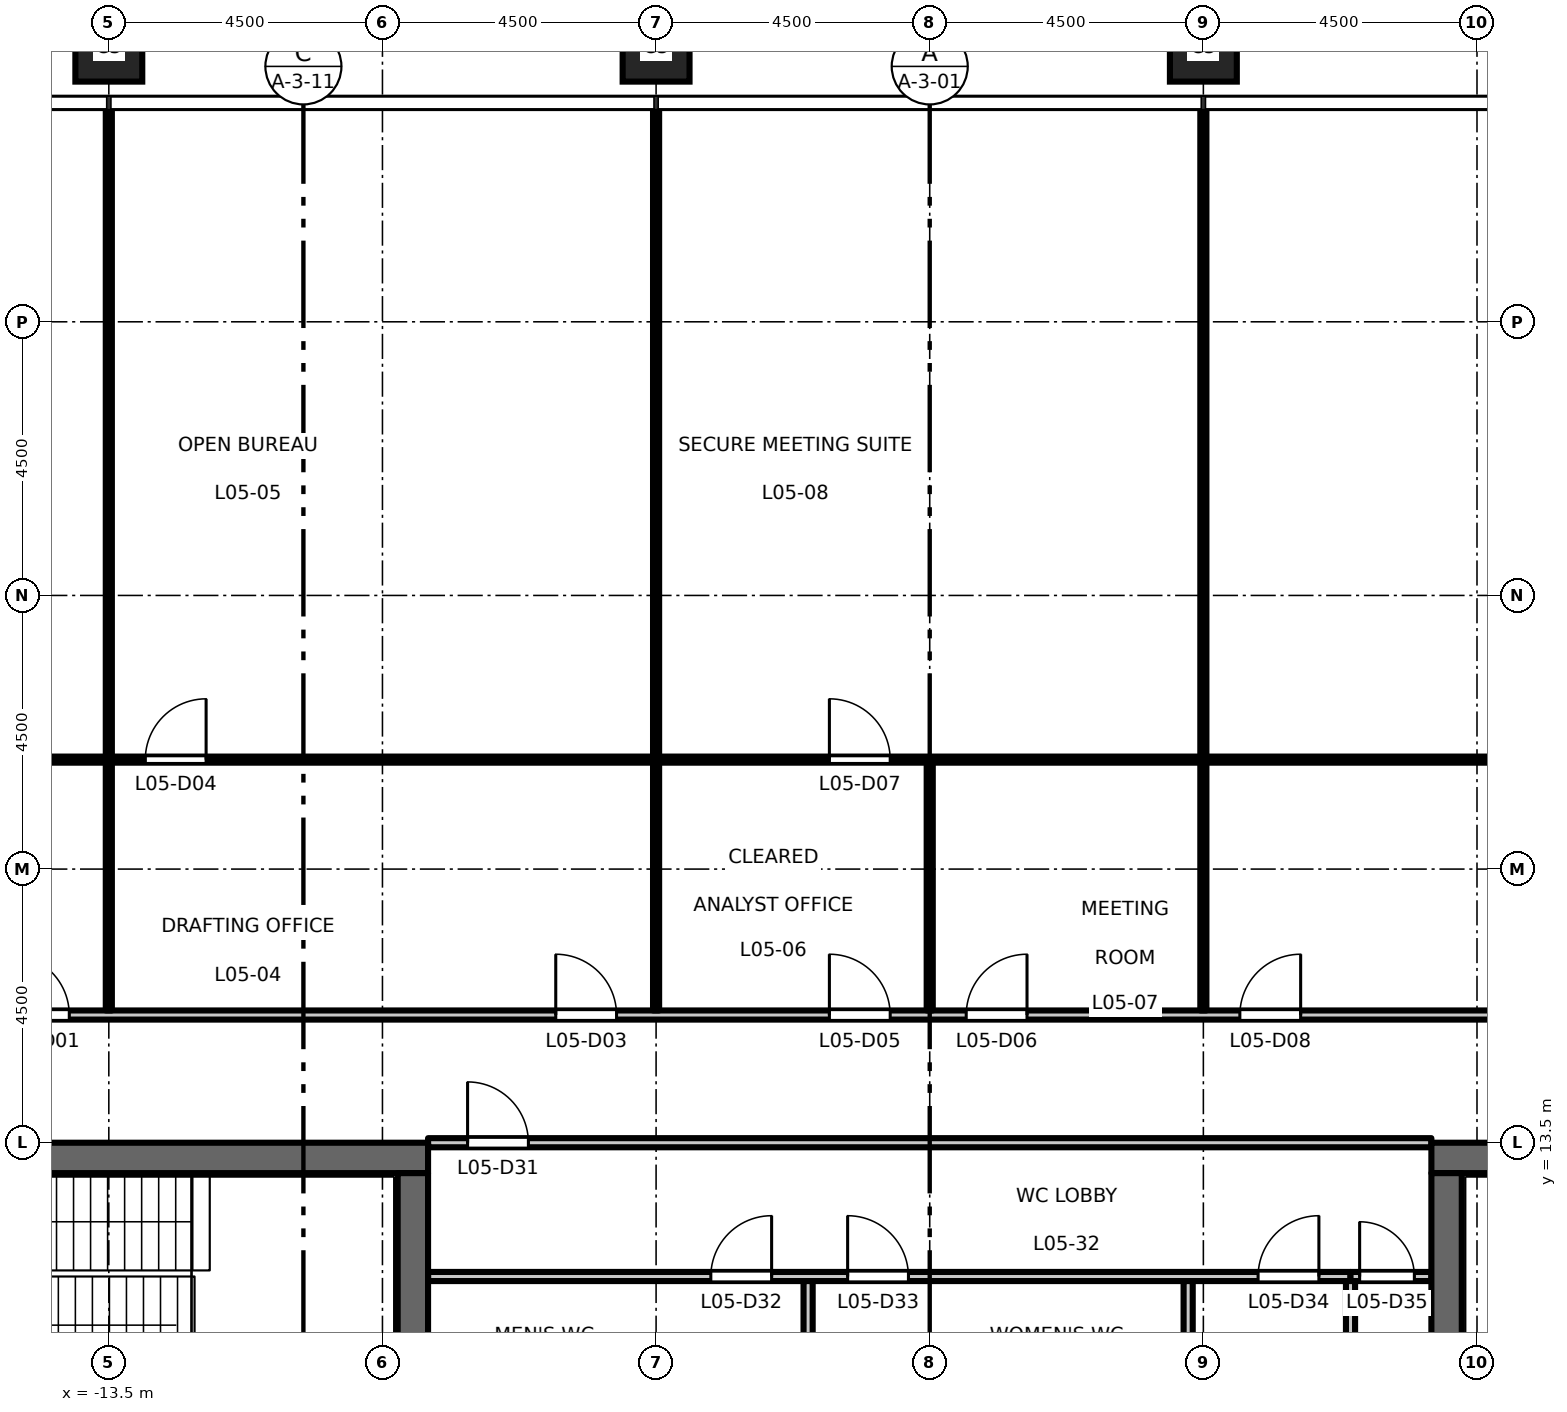
"""IFC4 building model, lengths in metres.
Left out: names, types, materials, properties, quantities, classifications, styles, units other than length and angle.
Written with IfcOpenShell. Run it as: python <this file> out.ifc"""

import sys

from ifc_helpers import new_model, si_unit, direction, frame, frame_2d, origin, origin_2d, place, context, subcontext, project, spatial, rectangle, hollow_rectangle, extrude, element, fill, save


model = new_model("IFC4")
c1 = context("Model", 3, precision=1e-05, world=origin(), true_north=direction((0.0, 1.0)))
c2 = subcontext(c1, "Body", "Model", "MODEL_VIEW")
j1 = project(units=[si_unit("LENGTHUNIT", "METRE"), si_unit("PLANEANGLEUNIT", "RADIAN")], contexts=[c1])
p1 = place(None, origin())
s1 = spatial("IfcSite", under=j1, at=p1, CompositionType="ELEMENT")
p2 = place(p1, origin())
s2 = spatial("IfcBuilding", under=s1, at=p2, CompositionType="ELEMENT")
p3 = place(p2, frame((0.0, 0.0, 26.7)))
s3 = spatial("IfcBuildingStorey", under=s2, at=p3, CompositionType="ELEMENT", Elevation=26.7)
for number, where, z_axis, x_axis in (
    (1, (4.5, 31.5, 0.0), (0.0, 0.0, 1.0), (1.0, 0.0, 0.0)),
    (2, (-4.5, 31.5, 0.0), (0.0, 0.0, 1.0), (1.0, 0.0, 0.0)),
    (3, (-13.5, 31.5, 0.0), (0.0, 0.0, 1.0), (1.0, 0.0, 0.0)),
):
    element("IfcColumn", number, at=place(p3, frame(where, z_axis=z_axis, x_axis=x_axis)), inside=s3, PredefinedType="COLUMN", context=c2, shape_type="SweptSolid", body=[
        extrude(hollow_rectangle(XDim=1.1, YDim=1.1, WallThickness=0.07, at=origin_2d()), origin(), (0.0, 0.0, 1.0), 4.5),
    ])
p4 = place(p3, frame((-8.25, 13.25, 0.0), z_axis=(0.0, 0.0, 1.0), x_axis=(-1.0, 0.0, 0.0)))
e4 = element("IfcWall", 4, at=p4, inside=s3, PredefinedType="SHEAR", context=c2, shape_type="SweptSolid", body=[
    extrude(rectangle(XDim=13.5, YDim=0.5, at=frame_2d((6.75, 0.0))), origin(), (0.0, 0.0, 1.0), 4.35),
])
p5 = place(p3, frame((-8.5, -13.0, 0.0), z_axis=(0.0, 0.0, 1.0), x_axis=(0.0, 1.0, 0.0)))
e5 = element("IfcWall", 5, at=p5, inside=s3, PredefinedType="SHEAR", context=c2, shape_type="SweptSolid", body=[
    extrude(rectangle(XDim=26.0, YDim=0.5, at=frame_2d((13.0, 0.0))), origin(), (0.0, 0.0, 1.0), 4.35),
])
p6 = place(p3, frame((8.25, 13.25, 0.0), z_axis=(0.0, 0.0, 1.0), x_axis=(1.0, 0.0, 0.0)))
e6 = element("IfcWall", 6, at=p6, inside=s3, PredefinedType="SHEAR", context=c2, shape_type="SweptSolid", body=[
    extrude(rectangle(XDim=13.5, YDim=0.5, at=frame_2d((6.75, 0.0))), origin(), (0.0, 0.0, 1.0), 4.35),
])
p7 = place(p3, frame((8.5, -13.0, 0.0), z_axis=(0.0, 0.0, 1.0), x_axis=(0.0, 1.0, 0.0)))
e7 = element("IfcWall", 7, at=p7, inside=s3, PredefinedType="SHEAR", context=c2, shape_type="SweptSolid", body=[
    extrude(rectangle(XDim=26.0, YDim=0.5, at=frame_2d((13.0, 0.0))), origin(), (0.0, 0.0, 1.0), 4.35),
])
p8 = place(p3, frame((-8.25, 11.3, 0.0), z_axis=(0.0, 0.0, 1.0), x_axis=(1.0, 0.0, 0.0)))
e8 = element("IfcWall", 8, at=p8, inside=s3, PredefinedType="PARTITIONING", context=c2, shape_type="SweptSolid", body=[
    extrude(rectangle(XDim=15.17, YDim=0.15, at=frame_2d((7.585, 0.0))), origin(), (0.0, 0.0, 1.0), 4.35),
])
p9 = place(p8, frame((4.65, 0.0, 0.0)))
e9 = element("IfcOpeningElement", 9, at=p9, cuts=e8, PredefinedType="OPENING", context=c2, shape_type="SweptSolid", body=[
    extrude(rectangle(XDim=1.0, YDim=2.1, at=frame_2d((0.5, 1.05))), frame((0.0, 0.085, 0.0), z_axis=(0.0, -1.0, 0.0), x_axis=(1.0, 0.0, 0.0)), (0.0, 0.0, 1.0), 0.17),
])
p10 = place(p8, frame((6.9, 0.0, 0.0)))
e10 = element("IfcOpeningElement", 10, at=p10, cuts=e8, PredefinedType="OPENING", context=c2, shape_type="SweptSolid", body=[
    extrude(rectangle(XDim=1.0, YDim=2.1, at=frame_2d((0.5, 1.05))), frame((0.0, 0.085, 0.0), z_axis=(0.0, -1.0, 0.0), x_axis=(1.0, 0.0, 0.0)), (0.0, 0.0, 1.0), 0.17),
])
p11 = place(p8, frame((13.65, 0.0, 0.0)))
e11 = element("IfcOpeningElement", 11, at=p11, cuts=e8, PredefinedType="OPENING", context=c2, shape_type="SweptSolid", body=[
    extrude(rectangle(XDim=1.0, YDim=2.1, at=frame_2d((0.5, 1.05))), frame((0.0, 0.085, 0.0), z_axis=(0.0, -1.0, 0.0), x_axis=(1.0, 0.0, 0.0)), (0.0, 0.0, 1.0), 0.17),
])
p12 = place(p3, frame((6.92, 11.3, 0.0), z_axis=(0.0, 0.0, 1.0), x_axis=(1.0, 0.0, 0.0)))
e12 = element("IfcWall", 12, at=p12, inside=s3, PredefinedType="PARTITIONING", context=c2, shape_type="SweptSolid", body=[
    extrude(rectangle(XDim=1.33, YDim=0.15, at=frame_2d((0.665, 0.0))), origin(), (0.0, 0.0, 1.0), 4.35),
])
p13 = place(p12, frame((0.15, 0.0, 0.0)))
e13 = element("IfcOpeningElement", 13, at=p13, cuts=e12, PredefinedType="OPENING", context=c2, shape_type="SweptSolid", body=[
    extrude(rectangle(XDim=0.9, YDim=2.1, at=frame_2d((0.45, 1.05))), frame((0.0, 0.085, 0.0), z_axis=(0.0, -1.0, 0.0), x_axis=(1.0, 0.0, 0.0)), (0.0, 0.0, 1.0), 0.17),
])
p14 = place(p3, frame((-8.25, 13.5, 0.0), z_axis=(0.0, 0.0, 1.0), x_axis=(1.0, 0.0, 0.0)))
e14 = element("IfcWall", 14, at=p14, inside=s3, PredefinedType="PARTITIONING", context=c2, shape_type="SweptSolid", body=[
    extrude(rectangle(XDim=16.5, YDim=0.15, at=frame_2d((8.25, 0.0))), origin(), (0.0, 0.0, 1.0), 3.85),
])
p15 = place(p14, frame((0.65, 0.0, 0.0)))
e15 = element("IfcOpeningElement", 15, at=p15, cuts=e14, PredefinedType="OPENING", context=c2, shape_type="SweptSolid", body=[
    extrude(rectangle(XDim=1.0, YDim=2.1, at=frame_2d((0.5, 1.05))), frame((0.0, 0.085, 0.0), z_axis=(0.0, -1.0, 0.0), x_axis=(1.0, 0.0, 0.0)), (0.0, 0.0, 1.0), 0.17),
])
p16 = place(p3, frame((-30.51, 15.6, 0.0), z_axis=(0.0, 0.0, 1.0), x_axis=(1.0, 0.0, 0.0)))
e16 = element("IfcWall", 16, at=p16, inside=s3, PredefinedType="PARTITIONING", context=c2, shape_type="SweptSolid", body=[
    extrude(rectangle(XDim=61.02, YDim=0.15, at=frame_2d((30.51, 0.0))), origin(), (0.0, 0.0, 1.0), 4.35),
])
p17 = place(p16, frame((15.36, 0.0, 0.0)))
e17 = element("IfcOpeningElement", 17, at=p17, cuts=e16, PredefinedType="OPENING", context=c2, shape_type="SweptSolid", body=[
    extrude(rectangle(XDim=1.0, YDim=2.1, at=frame_2d((0.5, 1.05))), frame((0.0, 0.085, 0.0), z_axis=(0.0, -1.0, 0.0), x_axis=(1.0, 0.0, 0.0)), (0.0, 0.0, 1.0), 0.17),
])
p18 = place(p16, frame((24.36, 0.0, 0.0)))
e18 = element("IfcOpeningElement", 18, at=p18, cuts=e16, PredefinedType="OPENING", context=c2, shape_type="SweptSolid", body=[
    extrude(rectangle(XDim=1.0, YDim=2.1, at=frame_2d((0.5, 1.05))), frame((0.0, 0.085, 0.0), z_axis=(0.0, -1.0, 0.0), x_axis=(1.0, 0.0, 0.0)), (0.0, 0.0, 1.0), 0.17),
])
p19 = place(p16, frame((28.86, 0.0, 0.0)))
e19 = element("IfcOpeningElement", 19, at=p19, cuts=e16, PredefinedType="OPENING", context=c2, shape_type="SweptSolid", body=[
    extrude(rectangle(XDim=1.0, YDim=2.1, at=frame_2d((0.5, 1.05))), frame((0.0, 0.085, 0.0), z_axis=(0.0, -1.0, 0.0), x_axis=(1.0, 0.0, 0.0)), (0.0, 0.0, 1.0), 0.17),
])
p20 = place(p16, frame((31.11, 0.0, 0.0)))
e20 = element("IfcOpeningElement", 20, at=p20, cuts=e16, PredefinedType="OPENING", context=c2, shape_type="SweptSolid", body=[
    extrude(rectangle(XDim=1.0, YDim=2.1, at=frame_2d((0.5, 1.05))), frame((0.0, 0.085, 0.0), z_axis=(0.0, -1.0, 0.0), x_axis=(1.0, 0.0, 0.0)), (0.0, 0.0, 1.0), 0.17),
])
p21 = place(p16, frame((35.61, 0.0, 0.0)))
e21 = element("IfcOpeningElement", 21, at=p21, cuts=e16, PredefinedType="OPENING", context=c2, shape_type="SweptSolid", body=[
    extrude(rectangle(XDim=1.0, YDim=2.1, at=frame_2d((0.5, 1.05))), frame((0.0, 0.085, 0.0), z_axis=(0.0, -1.0, 0.0), x_axis=(1.0, 0.0, 0.0)), (0.0, 0.0, 1.0), 0.17),
])
p22 = place(p16, frame((44.61, 0.0, 0.0)))
e22 = element("IfcOpeningElement", 22, at=p22, cuts=e16, PredefinedType="OPENING", context=c2, shape_type="SweptSolid", body=[
    extrude(rectangle(XDim=1.0, YDim=2.1, at=frame_2d((0.5, 1.05))), frame((0.0, 0.085, 0.0), z_axis=(0.0, -1.0, 0.0), x_axis=(1.0, 0.0, 0.0)), (0.0, 0.0, 1.0), 0.17),
])
p23 = place(p16, frame((0.61, 0.0, 0.0)))
e23 = element("IfcOpeningElement", 23, at=p23, cuts=e16, PredefinedType="OPENING", context=c2, shape_type="SweptSolid", body=[
    extrude(rectangle(XDim=1.0, YDim=2.1, at=frame_2d((0.5, 1.05))), frame((0.0, 0.085, 0.0), z_axis=(0.0, -1.0, 0.0), x_axis=(1.0, 0.0, 0.0)), (0.0, 0.0, 1.0), 0.17),
])
p24 = place(p16, frame((53.62, 0.0, 0.0)))
e24 = element("IfcOpeningElement", 24, at=p24, cuts=e16, PredefinedType="OPENING", context=c2, shape_type="SweptSolid", body=[
    extrude(rectangle(XDim=1.0, YDim=2.1, at=frame_2d((0.5, 1.05))), frame((0.0, 0.085, 0.0), z_axis=(0.0, -1.0, 0.0), x_axis=(1.0, 0.0, 0.0)), (0.0, 0.0, 1.0), 0.17),
])
p25 = place(p3, frame((-30.51, 19.8, 0.0), z_axis=(0.0, 0.0, 1.0), x_axis=(1.0, 0.0, 0.0)))
e25 = element("IfcWall", 25, at=p25, inside=s3, PredefinedType="PARTITIONING", context=c2, shape_type="SweptSolid", body=[
    extrude(rectangle(XDim=52.96, YDim=0.1, at=frame_2d((26.48, 0.0))), origin(), (0.0, 0.0, 1.0), 4.35),
])
p26 = place(p25, frame((8.61, 0.0, 0.0)))
e26 = element("IfcOpeningElement", 26, at=p26, cuts=e25, PredefinedType="OPENING", context=c2, shape_type="SweptSolid", body=[
    extrude(rectangle(XDim=1.0, YDim=2.1, at=frame_2d((0.5, 1.05))), frame((0.0, 0.06, 0.0), z_axis=(0.0, -1.0, 0.0), x_axis=(1.0, 0.0, 0.0)), (0.0, 0.0, 1.0), 0.12),
])
p27 = place(p25, frame((17.61, 0.0, 0.0)))
e27 = element("IfcOpeningElement", 27, at=p27, cuts=e25, PredefinedType="OPENING", context=c2, shape_type="SweptSolid", body=[
    extrude(rectangle(XDim=1.0, YDim=2.1, at=frame_2d((0.5, 1.05))), frame((0.0, 0.06, 0.0), z_axis=(0.0, -1.0, 0.0), x_axis=(1.0, 0.0, 0.0)), (0.0, 0.0, 1.0), 0.12),
])
p28 = place(p25, frame((28.86, 0.0, 0.0)))
e28 = element("IfcOpeningElement", 28, at=p28, cuts=e25, PredefinedType="OPENING", context=c2, shape_type="SweptSolid", body=[
    extrude(rectangle(XDim=1.0, YDim=2.1, at=frame_2d((0.5, 1.05))), frame((0.0, 0.06, 0.0), z_axis=(0.0, -1.0, 0.0), x_axis=(1.0, 0.0, 0.0)), (0.0, 0.0, 1.0), 0.12),
])
p29 = place(p25, frame((42.36, 0.0, 0.0)))
e29 = element("IfcOpeningElement", 29, at=p29, cuts=e25, PredefinedType="OPENING", context=c2, shape_type="SweptSolid", body=[
    extrude(rectangle(XDim=1.0, YDim=2.1, at=frame_2d((0.5, 1.05))), frame((0.0, 0.06, 0.0), z_axis=(0.0, -1.0, 0.0), x_axis=(1.0, 0.0, 0.0)), (0.0, 0.0, 1.0), 0.12),
])
p30 = place(p25, frame((51.36, 0.0, 0.0)))
e30 = element("IfcOpeningElement", 30, at=p30, cuts=e25, PredefinedType="OPENING", context=c2, shape_type="SweptSolid", body=[
    extrude(rectangle(XDim=1.0, YDim=2.1, at=frame_2d((0.5, 1.05))), frame((0.0, 0.06, 0.0), z_axis=(0.0, -1.0, 0.0), x_axis=(1.0, 0.0, 0.0)), (0.0, 0.0, 1.0), 0.12),
])
p31 = place(p25, frame((6.36, 0.0, 0.0)))
e31 = element("IfcOpeningElement", 31, at=p31, cuts=e25, PredefinedType="OPENING", context=c2, shape_type="SweptSolid", body=[
    extrude(rectangle(XDim=1.0, YDim=2.1, at=frame_2d((0.5, 1.05))), frame((0.0, 0.06, 0.0), z_axis=(0.0, -1.0, 0.0), x_axis=(1.0, 0.0, 0.0)), (0.0, 0.0, 1.0), 0.12),
])
p32 = place(p3, frame((-13.5, 15.675, 0.0), z_axis=(0.0, 0.0, 1.0), x_axis=(0.0, 1.0, 0.0)))
e32 = element("IfcWall", 32, at=p32, inside=s3, PredefinedType="PARTITIONING", context=c2, shape_type="SweptSolid", body=[
    extrude(rectangle(XDim=4.075, YDim=0.1, at=frame_2d((2.038, 0.0))), origin(), (0.0, 0.0, 1.0), 3.35),
])
p33 = place(p3, frame((-13.5, 19.85, 0.0), z_axis=(0.0, 0.0, 1.0), x_axis=(0.0, 1.0, 0.0)))
e33 = element("IfcWall", 33, at=p33, inside=s3, PredefinedType="PARTITIONING", context=c2, shape_type="SweptSolid", body=[
    extrude(rectangle(XDim=10.66, YDim=0.1, at=frame_2d((5.33, 0.0))), origin(), (0.0, 0.0, 1.0), 3.35),
])
p34 = place(p3, frame((-4.5, 15.675, 0.0), z_axis=(0.0, 0.0, 1.0), x_axis=(0.0, 1.0, 0.0)))
e34 = element("IfcWall", 34, at=p34, inside=s3, PredefinedType="PARTITIONING", context=c2, shape_type="SweptSolid", body=[
    extrude(rectangle(XDim=4.075, YDim=0.1, at=frame_2d((2.038, 0.0))), origin(), (0.0, 0.0, 1.0), 3.35),
])
p35 = place(p3, frame((-4.5, 19.85, 0.0), z_axis=(0.0, 0.0, 1.0), x_axis=(0.0, 1.0, 0.0)))
e35 = element("IfcWall", 35, at=p35, inside=s3, PredefinedType="PARTITIONING", context=c2, shape_type="SweptSolid", body=[
    extrude(rectangle(XDim=10.66, YDim=0.1, at=frame_2d((5.33, 0.0))), origin(), (0.0, 0.0, 1.0), 3.35),
])
p36 = place(p3, frame((-2.0, 8.37, 0.0), z_axis=(0.0, 0.0, 1.0), x_axis=(0.0, 1.0, 0.0)))
e36 = element("IfcWall", 36, at=p36, inside=s3, PredefinedType="PARTITIONING", context=c2, shape_type="SweptSolid", body=[
    extrude(rectangle(XDim=2.855, YDim=0.15, at=frame_2d((1.427, 0.0))), origin(), (0.0, 0.0, 1.0), 4.35),
])
p37 = place(p3, frame((0.0, 15.675, 0.0), z_axis=(0.0, 0.0, 1.0), x_axis=(0.0, 1.0, 0.0)))
e37 = element("IfcWall", 37, at=p37, inside=s3, PredefinedType="PARTITIONING", context=c2, shape_type="SweptSolid", body=[
    extrude(rectangle(XDim=4.075, YDim=0.1, at=frame_2d((2.038, 0.0))), origin(), (0.0, 0.0, 1.0), 4.35),
])
p38 = place(p3, frame((4.25, 8.37, 0.0), z_axis=(0.0, 0.0, 1.0), x_axis=(0.0, 1.0, 0.0)))
e38 = element("IfcWall", 38, at=p38, inside=s3, PredefinedType="PARTITIONING", context=c2, shape_type="SweptSolid", body=[
    extrude(rectangle(XDim=2.855, YDim=0.15, at=frame_2d((1.427, 0.0))), origin(), (0.0, 0.0, 1.0), 4.35),
])
p39 = place(p3, frame((4.5, 15.675, 0.0), z_axis=(0.0, 0.0, 1.0), x_axis=(0.0, 1.0, 0.0)))
e39 = element("IfcWall", 39, at=p39, inside=s3, PredefinedType="PARTITIONING", context=c2, shape_type="SweptSolid", body=[
    extrude(rectangle(XDim=4.075, YDim=0.1, at=frame_2d((2.038, 0.0))), origin(), (0.0, 0.0, 1.0), 3.35),
])
p40 = place(p3, frame((4.5, 19.85, 0.0), z_axis=(0.0, 0.0, 1.0), x_axis=(0.0, 1.0, 0.0)))
e40 = element("IfcWall", 40, at=p40, inside=s3, PredefinedType="PARTITIONING", context=c2, shape_type="SweptSolid", body=[
    extrude(rectangle(XDim=10.66, YDim=0.1, at=frame_2d((5.33, 0.0))), origin(), (0.0, 0.0, 1.0), 3.35),
])
p41 = place(p3, frame((6.92, 8.028, 0.0), z_axis=(0.0, 0.0, 1.0), x_axis=(0.0, 1.0, 0.0)))
e41 = element("IfcWall", 41, at=p41, inside=s3, PredefinedType="PARTITIONING", context=c2, shape_type="SweptSolid", body=[
    extrude(rectangle(XDim=3.197, YDim=0.15, at=frame_2d((1.599, 0.0))), origin(), (0.0, 0.0, 1.0), 4.35),
])
p42 = place(p17, origin())
e42 = element("IfcDoor", 42, at=p42, inside=s3, OperationType="SINGLE_SWING_LEFT", PredefinedType="DOOR", context=c2, shape_type="SweptSolid", body=[
    extrude(rectangle(XDim=1.0, YDim=2.1, at=frame_2d((0.5, 1.05))), frame((0.0, 0.025, 0.0), z_axis=(0.0, -1.0, 0.0), x_axis=(1.0, 0.0, 0.0)), (0.0, 0.0, 1.0), 0.05),
])
fill(e17, e42)
p43 = place(p18, origin())
e43 = element("IfcDoor", 43, at=p43, inside=s3, OperationType="SINGLE_SWING_LEFT", PredefinedType="DOOR", context=c2, shape_type="SweptSolid", body=[
    extrude(rectangle(XDim=1.0, YDim=2.1, at=frame_2d((0.5, 1.05))), frame((0.0, 0.025, 0.0), z_axis=(0.0, -1.0, 0.0), x_axis=(1.0, 0.0, 0.0)), (0.0, 0.0, 1.0), 0.05),
])
fill(e18, e43)
p44 = place(p27, origin())
e44 = element("IfcDoor", 44, at=p44, inside=s3, OperationType="SINGLE_SWING_RIGHT", PredefinedType="DOOR", context=c2, shape_type="SweptSolid", body=[
    extrude(rectangle(XDim=1.0, YDim=2.1, at=frame_2d((0.5, 1.05))), frame((0.0, 0.025, 0.0), z_axis=(0.0, -1.0, 0.0), x_axis=(1.0, 0.0, 0.0)), (0.0, 0.0, 1.0), 0.05),
])
fill(e27, e44)
p45 = place(p19, origin())
e45 = element("IfcDoor", 45, at=p45, inside=s3, OperationType="SINGLE_SWING_LEFT", PredefinedType="DOOR", context=c2, shape_type="SweptSolid", body=[
    extrude(rectangle(XDim=1.0, YDim=2.1, at=frame_2d((0.5, 1.05))), frame((0.0, 0.025, 0.0), z_axis=(0.0, -1.0, 0.0), x_axis=(1.0, 0.0, 0.0)), (0.0, 0.0, 1.0), 0.05),
])
fill(e19, e45)
p46 = place(p20, origin())
e46 = element("IfcDoor", 46, at=p46, inside=s3, OperationType="SINGLE_SWING_RIGHT", PredefinedType="DOOR", context=c2, shape_type="SweptSolid", body=[
    extrude(rectangle(XDim=1.0, YDim=2.1, at=frame_2d((0.5, 1.05))), frame((0.0, 0.025, 0.0), z_axis=(0.0, -1.0, 0.0), x_axis=(1.0, 0.0, 0.0)), (0.0, 0.0, 1.0), 0.05),
])
fill(e20, e46)
p47 = place(p28, origin())
e47 = element("IfcDoor", 47, at=p47, inside=s3, OperationType="SINGLE_SWING_LEFT", PredefinedType="DOOR", context=c2, shape_type="SweptSolid", body=[
    extrude(rectangle(XDim=1.0, YDim=2.1, at=frame_2d((0.5, 1.05))), frame((0.0, 0.025, 0.0), z_axis=(0.0, -1.0, 0.0), x_axis=(1.0, 0.0, 0.0)), (0.0, 0.0, 1.0), 0.05),
])
fill(e28, e47)
p48 = place(p21, origin())
e48 = element("IfcDoor", 48, at=p48, inside=s3, OperationType="SINGLE_SWING_RIGHT", PredefinedType="DOOR", context=c2, shape_type="SweptSolid", body=[
    extrude(rectangle(XDim=1.0, YDim=2.1, at=frame_2d((0.5, 1.05))), frame((0.0, 0.025, 0.0), z_axis=(0.0, -1.0, 0.0), x_axis=(1.0, 0.0, 0.0)), (0.0, 0.0, 1.0), 0.05),
])
fill(e21, e48)
p49 = place(p15, origin())
e49 = element("IfcDoor", 49, at=p49, inside=s3, OperationType="SINGLE_SWING_LEFT", PredefinedType="DOOR", context=c2, shape_type="SweptSolid", body=[
    extrude(rectangle(XDim=1.0, YDim=2.1, at=frame_2d((0.5, 1.05))), frame((0.0, 0.025, 0.0), z_axis=(0.0, -1.0, 0.0), x_axis=(1.0, 0.0, 0.0)), (0.0, 0.0, 1.0), 0.05),
])
fill(e15, e49)
p50 = place(p9, origin())
e50 = element("IfcDoor", 50, at=p50, inside=s3, OperationType="SINGLE_SWING_RIGHT", PredefinedType="DOOR", context=c2, shape_type="SweptSolid", body=[
    extrude(rectangle(XDim=1.0, YDim=2.1, at=frame_2d((0.5, 1.05))), frame((0.0, 0.025, 0.0), z_axis=(0.0, -1.0, 0.0), x_axis=(1.0, 0.0, 0.0)), (0.0, 0.0, 1.0), 0.05),
])
fill(e9, e50)
p51 = place(p10, origin())
e51 = element("IfcDoor", 51, at=p51, inside=s3, OperationType="SINGLE_SWING_LEFT", PredefinedType="DOOR", context=c2, shape_type="SweptSolid", body=[
    extrude(rectangle(XDim=1.0, YDim=2.1, at=frame_2d((0.5, 1.05))), frame((0.0, 0.025, 0.0), z_axis=(0.0, -1.0, 0.0), x_axis=(1.0, 0.0, 0.0)), (0.0, 0.0, 1.0), 0.05),
])
fill(e10, e51)
p52 = place(p11, origin())
e52 = element("IfcDoor", 52, at=p52, inside=s3, OperationType="SINGLE_SWING_RIGHT", PredefinedType="DOOR", context=c2, shape_type="SweptSolid", body=[
    extrude(rectangle(XDim=1.0, YDim=2.1, at=frame_2d((0.5, 1.05))), frame((0.0, 0.025, 0.0), z_axis=(0.0, -1.0, 0.0), x_axis=(1.0, 0.0, 0.0)), (0.0, 0.0, 1.0), 0.05),
])
fill(e11, e52)
p53 = place(p13, origin())
e53 = element("IfcDoor", 53, at=p53, inside=s3, OperationType="SINGLE_SWING_LEFT", PredefinedType="DOOR", context=c2, shape_type="SweptSolid", body=[
    extrude(rectangle(XDim=0.9, YDim=2.1, at=frame_2d((0.45, 1.05))), frame((0.0, 0.025, 0.0), z_axis=(0.0, -1.0, 0.0), x_axis=(1.0, 0.0, 0.0)), (0.0, 0.0, 1.0), 0.05),
])
fill(e13, e53)
save(model, sys.argv[1])
